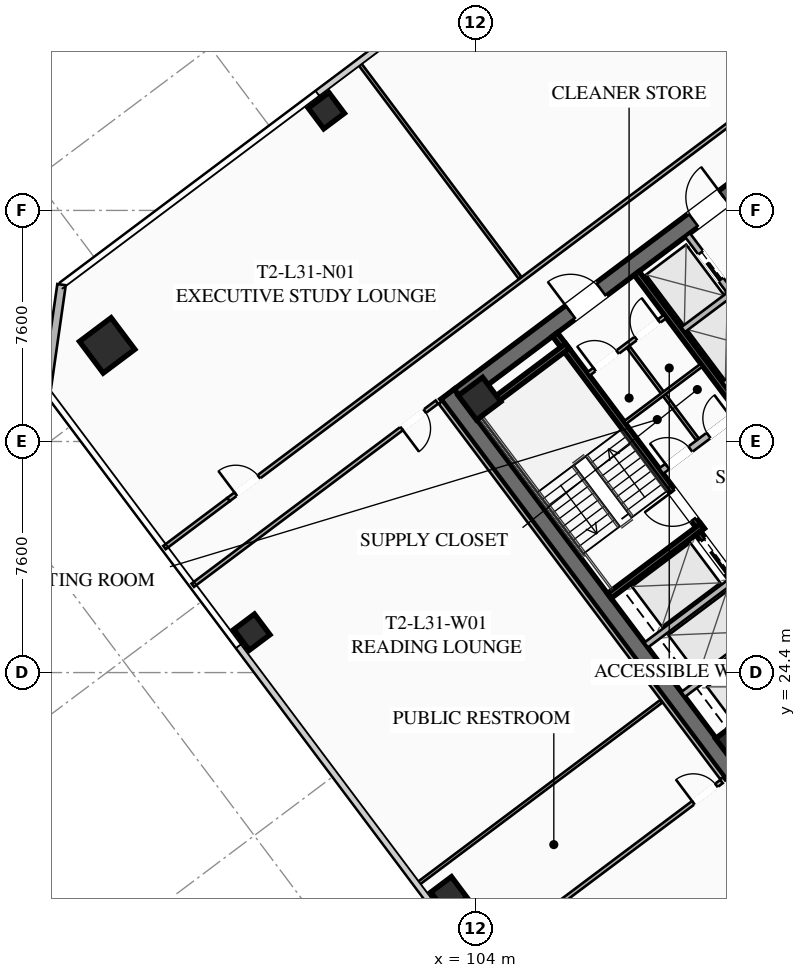
"""IFC4 building model, lengths in metres.
Left out: names, types, materials, properties, quantities, classifications, styles, units other than length and angle.
Written with IfcOpenShell. Run it as: python <this file> out.ifc"""

import sys

from ifc_helpers import new_model, si_unit, direction, frame, frame_2d, origin, origin_2d, place, context, subcontext, project, spatial, rectangle, hollow_rectangle, extrude, element, fill, save


model = new_model("IFC4")
c1 = context("Model", 3, precision=1e-05, world=origin(), true_north=direction((0.0, 1.0)))
c2 = subcontext(c1, "Body", "Model", "MODEL_VIEW")
j1 = project(units=[si_unit("LENGTHUNIT", "METRE"), si_unit("PLANEANGLEUNIT", "RADIAN")], contexts=[c1])
p1 = place(None, origin())
s1 = spatial("IfcSite", under=j1, at=p1, CompositionType="ELEMENT")
p2 = place(p1, origin())
s2 = spatial("IfcBuilding", under=s1, at=p2, CompositionType="ELEMENT")
p3 = place(p2, frame((0.0, 0.0, 117.95)))
s3 = spatial("IfcBuildingStorey", under=s2, at=p3, CompositionType="ELEMENT", Elevation=117.95)
p4 = place(p3, frame((112.436, 21.077, 0.0), z_axis=(0.0, 0.0, 1.0), x_axis=(-0.600005007985, 0.799996243986, 0.0)))
e1 = element("IfcWall", 1, at=p4, inside=s3, PredefinedType="SHEAR", context=c2, shape_type="SweptSolid", body=[
    extrude(rectangle(XDim=15.6, YDim=0.55, at=frame_2d((7.8, 0.0))), origin(), (0.0, 0.0, 1.0), 3.55),
])
p5 = place(p3, frame((103.461, 33.502, 0.0), z_axis=(0.0, 0.0, 1.0), x_axis=(0.799998054672, 0.600002593761, 0.0)))
e2 = element("IfcWall", 2, at=p5, inside=s3, PredefinedType="SHEAR", context=c2, shape_type="SweptSolid", body=[
    extrude(rectangle(XDim=15.06, YDim=0.55, at=frame_2d((7.53, 0.0))), origin(), (0.0, 0.0, 1.0), 3.55),
])
p6 = place(p5, frame((4.58, 0.0, 0.0)))
e3 = element("IfcOpeningElement", 3, at=p6, cuts=e2, PredefinedType="OPENING", context=c2, shape_type="SweptSolid", body=[
    extrude(rectangle(XDim=1.25, YDim=2.25, at=frame_2d((0.625, 1.125))), frame((0.0, 0.285, 0.0), z_axis=(0.0, -1.0, 0.0), x_axis=(1.0, 0.0, 0.0)), (0.0, 0.0, 1.0), 0.57),
])
p7 = place(p5, frame((9.63, 0.0, 0.0)))
e4 = element("IfcOpeningElement", 4, at=p7, cuts=e2, PredefinedType="OPENING", context=c2, shape_type="SweptSolid", body=[
    extrude(rectangle(XDim=1.25, YDim=2.25, at=frame_2d((0.625, 1.125))), frame((0.0, 0.285, 0.0), z_axis=(0.0, -1.0, 0.0), x_axis=(1.0, 0.0, 0.0)), (0.0, 0.0, 1.0), 0.57),
])
for number, where, z_axis, x_axis in (
    (5, (112.59, 22.13, 0.0), (0.0, 0.0, 1.0), (0.8, 0.6, 0.0)),
    (6, (104.13, 33.41, 0.0), (0.0, 0.0, 1.0), (0.8, 0.6, 0.0)),
):
    element("IfcColumn", number, at=place(p3, frame(where, z_axis=z_axis, x_axis=x_axis)), inside=s3, PredefinedType="COLUMN", context=c2, shape_type="SweptSolid", body=[
        extrude(hollow_rectangle(XDim=1.0, YDim=1.0, WallThickness=0.04, at=origin_2d()), origin(), (0.0, 0.0, 1.0), 3.37),
    ])
p8 = place(p3, frame((91.88, 35.16, 0.0), z_axis=(0.0, 0.0, 1.0), x_axis=(0.799999996291, 0.600000004945, 0.0)))
e7 = element("IfcColumn", 7, at=p8, inside=s3, PredefinedType="COLUMN", context=c2, shape_type="SweptSolid", body=[
    extrude(hollow_rectangle(XDim=1.3, YDim=1.3, WallThickness=0.05, at=origin_2d()), origin(), (0.0, 0.0, 1.0), 3.37),
])
for number, where, z_axis, x_axis in (
    (8, (99.09, 42.88, 0.0), (0.0, 0.0, 1.0), (0.8, 0.6, 0.0)),
    (9, (96.64, 25.73, 0.0), (0.0, 0.0, 1.0), (0.8, 0.6, 0.0)),
    (10, (103.12, 17.09, 0.0), (0.0, 0.0, 1.0), (0.8, 0.6, 0.0)),
):
    element("IfcColumn", number, at=place(p3, frame(where, z_axis=z_axis, x_axis=x_axis)), inside=s3, PredefinedType="COLUMN", context=c2, shape_type="SweptSolid", body=[
        extrude(hollow_rectangle(XDim=0.85, YDim=0.85, WallThickness=0.035, at=origin_2d()), origin(), (0.0, 0.0, 1.0), 3.37),
    ])
p9 = place(p3, frame((89.88, 33.66, 0.0), z_axis=(0.0, 0.0, 1.0), x_axis=(0.141421356237, 0.989949493661, 0.0)))
e11 = element("IfcWall", 11, at=p9, inside=s3, PredefinedType="SOLIDWALL", context=c2, shape_type="SweptSolid", body=[
    extrude(rectangle(XDim=3.536, YDim=0.28, at=frame_2d((1.768, 0.0))), origin(), (0.0, 0.0, 1.0), 3.37),
])
p10 = place(p3, frame((111.44, 29.08, 0.0), z_axis=(0.0, 0.0, 1.0), x_axis=(-0.59999029481, 0.8000072788, 0.0)))
e12 = element("IfcWall", 12, at=p10, inside=s3, PredefinedType="SHEAR", context=c2, shape_type="SweptSolid", body=[
    extrude(rectangle(XDim=8.05, YDim=0.2, at=frame_2d((4.025, 0.0))), origin(), (0.0, 0.0, 1.0), 3.37),
])
p11 = place(p10, frame((0.45, 0.0, 0.0)))
e13 = element("IfcOpeningElement", 13, at=p11, cuts=e12, PredefinedType="OPENING", context=c2, shape_type="SweptSolid", body=[
    extrude(rectangle(XDim=1.15, YDim=2.2, at=frame_2d((0.575, 1.1))), frame((0.0, 0.11, 0.0), z_axis=(0.0, -1.0, 0.0), x_axis=(1.0, 0.0, 0.0)), (0.0, 0.0, 1.0), 0.22),
])
for number, where, z_axis, x_axis in (
    (14, (108.396, 26.922, 0.0), (0.0, 0.0, 1.0), (0.8, 0.6, 0.0)),
    (15, (103.956, 32.842, 0.0), (0.0, 0.0, 1.0), (0.8, 0.6, 0.0)),
):
    element("IfcWall", number, at=place(p3, frame(where, z_axis=z_axis, x_axis=x_axis)), inside=s3, PredefinedType="SHEAR", context=c2, shape_type="SweptSolid", body=[
        extrude(rectangle(XDim=3.83, YDim=0.2, at=frame_2d((1.915, 0.0))), origin(), (0.0, 0.0, 1.0), 3.37),
    ])
p12 = place(p3, frame((117.998, 25.936, 0.0), z_axis=(0.0, 0.0, 1.0), x_axis=(-0.600002693989, 0.799997979501, 0.0)))
e16 = element("IfcWall", 16, at=p12, inside=s3, PredefinedType="SHEAR", context=c2, shape_type="SweptSolid", body=[
    extrude(rectangle(XDim=14.5, YDim=0.2, at=frame_2d((7.25, 0.0))), origin(), (0.0, 0.0, 1.0), 3.37),
])
p13 = place(p3, frame((110.104, 31.028, 0.0), z_axis=(0.0, 0.0, 1.0), x_axis=(0.800018601094, 0.59997519774, 0.0)))
e17 = element("IfcWall", 17, at=p13, inside=s3, PredefinedType="SOLIDWALL", context=c2, shape_type="SweptSolid", body=[
    extrude(rectangle(XDim=3.15, YDim=0.22, at=frame_2d((1.575, 0.0))), origin(), (0.0, 0.0, 1.0), 2.723),
])
p14 = place(p13, frame((0.25, 0.0, 0.0)))
e18 = element("IfcOpeningElement", 18, at=p14, cuts=e17, PredefinedType="OPENING", context=c2, shape_type="SweptSolid", body=[
    extrude(rectangle(XDim=0.95, YDim=2.05, at=frame_2d((0.475, 1.025))), frame((0.0, 0.12, 0.0), z_axis=(0.0, -1.0, 0.0), x_axis=(1.0, 0.0, 0.0)), (0.0, 0.0, 1.0), 0.24),
])
p15 = place(p13, frame((1.95, 0.0, 0.0)))
e19 = element("IfcOpeningElement", 19, at=p15, cuts=e17, PredefinedType="OPENING", context=c2, shape_type="SweptSolid", body=[
    extrude(rectangle(XDim=0.95, YDim=2.05, at=frame_2d((0.475, 1.025))), frame((0.0, 0.12, 0.0), z_axis=(0.0, -1.0, 0.0), x_axis=(1.0, 0.0, 0.0)), (0.0, 0.0, 1.0), 0.24),
])
p16 = place(p3, frame((115.19, 23.83, 0.0), z_axis=(0.0, 0.0, 1.0), x_axis=(-0.599993943644, 0.800004542231, 0.0)))
e20 = element("IfcWall", 20, at=p16, inside=s3, PredefinedType="SHEAR", context=c2, shape_type="SweptSolid", body=[
    extrude(rectangle(XDim=6.45, YDim=0.2, at=frame_2d((3.225, 0.0))), origin(), (0.0, 0.0, 1.0), 3.37),
])
p17 = place(p16, frame((4.875, 0.0, 0.0)))
e21 = element("IfcOpeningElement", 21, at=p17, cuts=e20, PredefinedType="OPENING", context=c2, shape_type="SweptSolid", body=[
    extrude(rectangle(XDim=1.3, YDim=2.25, at=frame_2d((0.65, 1.125))), frame((0.0, 0.11, 0.0), z_axis=(0.0, -1.0, 0.0), x_axis=(1.0, 0.0, 0.0)), (0.0, 0.0, 1.0), 0.22),
])
p18 = place(p16, frame((2.875, 0.0, 0.0)))
e22 = element("IfcOpeningElement", 22, at=p18, cuts=e20, PredefinedType="OPENING", context=c2, shape_type="SweptSolid", body=[
    extrude(rectangle(XDim=1.3, YDim=2.25, at=frame_2d((0.65, 1.125))), frame((0.0, 0.11, 0.0), z_axis=(0.0, -1.0, 0.0), x_axis=(1.0, 0.0, 0.0)), (0.0, 0.0, 1.0), 0.22),
])
p19 = place(p16, frame((0.675, 0.0, 0.0)))
e23 = element("IfcOpeningElement", 23, at=p19, cuts=e20, PredefinedType="OPENING", context=c2, shape_type="SweptSolid", body=[
    extrude(rectangle(XDim=1.3, YDim=2.25, at=frame_2d((0.65, 1.125))), frame((0.0, 0.11, 0.0), z_axis=(0.0, -1.0, 0.0), x_axis=(1.0, 0.0, 0.0)), (0.0, 0.0, 1.0), 0.22),
])
for number, where, z_axis, x_axis in (
    (24, (110.826, 23.682, 0.0), (0.0, 0.0, 1.0), (0.8, 0.6, 0.0)),
    (25, (109.608, 25.306, 0.0), (0.0, 0.0, 1.0), (0.8, 0.6, 0.0)),
):
    element("IfcWall", number, at=place(p3, frame(where, z_axis=z_axis, x_axis=x_axis)), inside=s3, PredefinedType="SOLIDWALL", context=c2, shape_type="SweptSolid", body=[
        extrude(rectangle(XDim=3.48, YDim=0.2, at=frame_2d((1.74, 0.0))), origin(), (0.0, 0.0, 1.0), 3.37),
    ])
p20 = place(p3, frame((107.71, 34.22, 0.0), z_axis=(0.0, 0.0, 1.0), x_axis=(0.799981399002, 0.60002480053, 0.0)))
e26 = element("IfcWall", 26, at=p20, inside=s3, PredefinedType="PARTITIONING", context=c2, shape_type="SweptSolid", body=[
    extrude(rectangle(XDim=3.15, YDim=0.135, at=frame_2d((1.575, 0.0))), origin(), (0.0, 0.0, 1.0), 2.723),
])
p21 = place(p20, frame((0.25, 0.0, 0.0)))
e27 = element("IfcOpeningElement", 27, at=p21, cuts=e26, PredefinedType="OPENING", context=c2, shape_type="SweptSolid", body=[
    extrude(rectangle(XDim=0.95, YDim=2.05, at=frame_2d((0.475, 1.025))), frame((0.0, 0.077, 0.0), z_axis=(0.0, -1.0, 0.0), x_axis=(1.0, 0.0, 0.0)), (0.0, 0.0, 1.0), 0.155),
])
p22 = place(p20, frame((1.95, 0.0, 0.0)))
e28 = element("IfcOpeningElement", 28, at=p22, cuts=e26, PredefinedType="OPENING", context=c2, shape_type="SweptSolid", body=[
    extrude(rectangle(XDim=0.95, YDim=2.05, at=frame_2d((0.475, 1.025))), frame((0.0, 0.077, 0.0), z_axis=(0.0, -1.0, 0.0), x_axis=(1.0, 0.0, 0.0)), (0.0, 0.0, 1.0), 0.155),
])
p23 = place(p3, frame((111.296, 32.072, 0.0), z_axis=(0.0, 0.0, 1.0), x_axis=(-0.59995887973, 0.800030838552, 0.0)))
e29 = element("IfcWall", 29, at=p23, inside=s3, PredefinedType="PARTITIONING", context=c2, shape_type="SweptSolid", body=[
    extrude(rectangle(XDim=3.8, YDim=0.11, at=frame_2d((1.9, 0.0))), origin(), (0.0, 0.0, 1.0), 2.723),
])
p24 = place(p3, frame((108.91, 32.62, 0.0), z_axis=(0.0, 0.0, 1.0), x_axis=(0.800018601094, 0.59997519774, 0.0)))
e30 = element("IfcWall", 30, at=p24, inside=s3, PredefinedType="PARTITIONING", context=c2, shape_type="SweptSolid", body=[
    extrude(rectangle(XDim=3.15, YDim=0.11, at=frame_2d((1.575, 0.0))), origin(), (0.0, 0.0, 1.0), 2.723),
])
p25 = place(p3, frame((115.11, 33.27, 0.0), z_axis=(0.0, 0.0, 1.0), x_axis=(-0.600011322243, 0.799991508192, 0.0)))
e31 = element("IfcWall", 31, at=p25, inside=s3, PredefinedType="SOLIDWALL", context=c2, shape_type="SweptSolid", body=[
    extrude(rectangle(XDim=6.9, YDim=0.2, at=frame_2d((3.45, 0.0))), origin(), (0.0, 0.0, 1.0), 3.37),
])
p26 = place(p25, frame((0.575, 0.0, 0.0)))
e32 = element("IfcOpeningElement", 32, at=p26, cuts=e31, PredefinedType="OPENING", context=c2, shape_type="SweptSolid", body=[
    extrude(rectangle(XDim=1.1, YDim=2.2, at=frame_2d((0.55, 1.1))), frame((0.0, 0.11, 0.0), z_axis=(0.0, -1.0, 0.0), x_axis=(1.0, 0.0, 0.0)), (0.0, 0.0, 1.0), 0.22),
])
p27 = place(p25, frame((2.825, 0.0, 0.0)))
e33 = element("IfcOpeningElement", 33, at=p27, cuts=e31, PredefinedType="OPENING", context=c2, shape_type="SweptSolid", body=[
    extrude(rectangle(XDim=1.1, YDim=2.2, at=frame_2d((0.55, 1.1))), frame((0.0, 0.11, 0.0), z_axis=(0.0, -1.0, 0.0), x_axis=(1.0, 0.0, 0.0)), (0.0, 0.0, 1.0), 0.22),
])
p28 = place(p25, frame((5.075, 0.0, 0.0)))
e34 = element("IfcOpeningElement", 34, at=p28, cuts=e31, PredefinedType="OPENING", context=c2, shape_type="SweptSolid", body=[
    extrude(rectangle(XDim=1.1, YDim=2.2, at=frame_2d((0.55, 1.1))), frame((0.0, 0.11, 0.0), z_axis=(0.0, -1.0, 0.0), x_axis=(1.0, 0.0, 0.0)), (0.0, 0.0, 1.0), 0.22),
])
p29 = place(p3, frame((112.176, 33.882, 0.0), z_axis=(0.0, 0.0, 1.0), x_axis=(0.8, 0.6, 0.0)))
e35 = element("IfcWall", 35, at=p29, inside=s3, PredefinedType="SOLIDWALL", context=c2, shape_type="SweptSolid", body=[
    extrude(rectangle(XDim=1.88, YDim=0.2, at=frame_2d((0.94, 0.0))), origin(), (0.0, 0.0, 1.0), 3.37),
])
p30 = place(p3, frame((110.826, 35.682, 0.0), z_axis=(0.0, 0.0, 1.0), x_axis=(0.799984418148, 0.600020775241, 0.0)))
e36 = element("IfcWall", 36, at=p30, inside=s3, PredefinedType="SOLIDWALL", context=c2, shape_type="SweptSolid", body=[
    extrude(rectangle(XDim=1.88, YDim=0.2, at=frame_2d((0.94, 0.0))), origin(), (0.0, 0.0, 1.0), 3.37),
])
p31 = place(p3, frame((95.87, 30.09, 0.0), z_axis=(0.0, 0.0, 1.0), x_axis=(0.799997191971, 0.600003744021, 0.0)))
e37 = element("IfcWall", 37, at=p31, inside=s3, PredefinedType="PARTITIONING", context=c2, shape_type="SweptSolid", body=[
    extrude(rectangle(XDim=31.3, YDim=0.135, at=frame_2d((15.65, 0.0))), origin(), (0.0, 0.0, 1.0), 2.723),
])
p32 = place(p31, frame((0.3, 0.0, 0.0)))
e38 = element("IfcOpeningElement", 38, at=p32, cuts=e37, PredefinedType="OPENING", context=c2, shape_type="SweptSolid", body=[
    extrude(rectangle(XDim=0.95, YDim=2.05, at=frame_2d((0.475, 1.025))), frame((0.0, 0.077, 0.0), z_axis=(0.0, -1.0, 0.0), x_axis=(1.0, 0.0, 0.0)), (0.0, 0.0, 1.0), 0.155),
])
p33 = place(p31, frame((30.05, 0.0, 0.0)))
e39 = element("IfcOpeningElement", 39, at=p33, cuts=e37, PredefinedType="OPENING", context=c2, shape_type="SweptSolid", body=[
    extrude(rectangle(XDim=0.95, YDim=2.05, at=frame_2d((0.475, 1.025))), frame((0.0, 0.077, 0.0), z_axis=(0.0, -1.0, 0.0), x_axis=(1.0, 0.0, 0.0)), (0.0, 0.0, 1.0), 0.155),
])
p34 = place(p3, frame((93.766, 28.512, 0.0), z_axis=(0.0, 0.0, 1.0), x_axis=(0.799977721118, 0.600029704027, 0.0)))
e40 = element("IfcWall", 40, at=p34, inside=s3, PredefinedType="PARTITIONING", context=c2, shape_type="SweptSolid", body=[
    extrude(rectangle(XDim=2.63, YDim=0.135, at=frame_2d((1.315, 0.0))), origin(), (0.0, 0.0, 1.0), 2.723),
])
p35 = place(p3, frame((105.462, 37.384, 0.0), z_axis=(0.0, 0.0, 1.0), x_axis=(-0.599982344389, 0.800013241404, 0.0)))
e41 = element("IfcWall", 41, at=p35, inside=s3, PredefinedType="PARTITIONING", context=c2, shape_type="SweptSolid", body=[
    extrude(rectangle(XDim=8.85, YDim=0.11, at=frame_2d((4.425, 0.0))), origin(), (0.0, 0.0, 1.0), 2.723),
])
p36 = place(p3, frame((133.282, 32.374, 0.0), z_axis=(0.0, 0.0, 1.0), x_axis=(-0.8, -0.6, 0.0)))
e42 = element("IfcWall", 42, at=p36, inside=s3, PredefinedType="PARTITIONING", context=c2, shape_type="SweptSolid", body=[
    extrude(rectangle(XDim=31.3, YDim=0.135, at=frame_2d((15.65, 0.0))), origin(), (0.0, 0.0, 1.0), 2.723),
])
p37 = place(p36, frame((29.97, 0.0, 0.0)))
e43 = element("IfcOpeningElement", 43, at=p37, cuts=e42, PredefinedType="OPENING", context=c2, shape_type="SweptSolid", body=[
    extrude(rectangle(XDim=0.95, YDim=2.05, at=frame_2d((0.475, 1.025))), frame((0.0, 0.077, 0.0), z_axis=(0.0, -1.0, 0.0), x_axis=(1.0, 0.0, 0.0)), (0.0, 0.0, 1.0), 0.155),
])
p38 = place(p36, frame((19.151, 0.0, 0.0)))
e44 = element("IfcOpeningElement", 44, at=p38, cuts=e42, PredefinedType="OPENING", context=c2, shape_type="SweptSolid", body=[
    extrude(rectangle(XDim=0.95, YDim=2.05, at=frame_2d((0.475, 1.025))), frame((0.0, 0.077, 0.0), z_axis=(0.0, -1.0, 0.0), x_axis=(1.0, 0.0, 0.0)), (0.0, 0.0, 1.0), 0.155),
])
p39 = place(p36, frame((14.901, 0.0, 0.0)))
e45 = element("IfcOpeningElement", 45, at=p39, cuts=e42, PredefinedType="OPENING", context=c2, shape_type="SweptSolid", body=[
    extrude(rectangle(XDim=0.95, YDim=2.05, at=frame_2d((0.475, 1.025))), frame((0.0, 0.077, 0.0), z_axis=(0.0, -1.0, 0.0), x_axis=(1.0, 0.0, 0.0)), (0.0, 0.0, 1.0), 0.155),
])
p40 = place(p36, frame((10.92, 0.0, 0.0)))
e46 = element("IfcOpeningElement", 46, at=p40, cuts=e42, PredefinedType="OPENING", context=c2, shape_type="SweptSolid", body=[
    extrude(rectangle(XDim=0.95, YDim=2.05, at=frame_2d((0.475, 1.025))), frame((0.0, 0.077, 0.0), z_axis=(0.0, -1.0, 0.0), x_axis=(1.0, 0.0, 0.0)), (0.0, 0.0, 1.0), 0.155),
])
p41 = place(p36, frame((0.38, 0.0, 0.0)))
e47 = element("IfcOpeningElement", 47, at=p41, cuts=e42, PredefinedType="OPENING", context=c2, shape_type="SweptSolid", body=[
    extrude(rectangle(XDim=0.95, YDim=2.05, at=frame_2d((0.475, 1.025))), frame((0.0, 0.077, 0.0), z_axis=(0.0, -1.0, 0.0), x_axis=(1.0, 0.0, 0.0)), (0.0, 0.0, 1.0), 0.155),
])
p42 = place(p3, frame((112.104, 20.928, 0.0), z_axis=(0.0, 0.0, 1.0), x_axis=(-0.599994940075, 0.800003794918, 0.0)))
e48 = element("IfcWall", 48, at=p42, inside=s3, PredefinedType="PARTITIONING", context=c2, shape_type="SweptSolid", body=[
    extrude(rectangle(XDim=15.44, YDim=0.135, at=frame_2d((7.72, 0.0))), origin(), (0.0, 0.0, 1.0), 2.723),
])
p43 = place(p3, frame((102.728, 33.296, 0.0), z_axis=(0.0, 0.0, 1.0), x_axis=(-0.800002918023, -0.599996109283, 0.0)))
e49 = element("IfcWall", 49, at=p43, inside=s3, PredefinedType="PARTITIONING", context=c2, shape_type="SweptSolid", body=[
    extrude(rectangle(XDim=10.04, YDim=0.135, at=frame_2d((5.02, 0.0))), origin(), (0.0, 0.0, 1.0), 2.723),
])
p44 = place(p43, frame((0.5, 0.0, 0.0)))
e50 = element("IfcOpeningElement", 50, at=p44, cuts=e49, PredefinedType="OPENING", context=c2, shape_type="SweptSolid", body=[
    extrude(rectangle(XDim=0.95, YDim=2.05, at=frame_2d((0.475, 1.025))), frame((0.0, 0.077, 0.0), z_axis=(0.0, -1.0, 0.0), x_axis=(1.0, 0.0, 0.0)), (0.0, 0.0, 1.0), 0.155),
])
p45 = place(p3, frame((104.056, 14.792, 0.0), z_axis=(0.0, 0.0, 1.0), x_axis=(0.800002918023, 0.599996109283, 0.0)))
e51 = element("IfcWall", 51, at=p45, inside=s3, PredefinedType="PARTITIONING", context=c2, shape_type="SweptSolid", body=[
    extrude(rectangle(XDim=10.04, YDim=0.135, at=frame_2d((5.02, 0.0))), origin(), (0.0, 0.0, 1.0), 2.723),
])
p46 = place(p45, frame((8.88, 0.0, 0.0)))
e52 = element("IfcOpeningElement", 52, at=p46, cuts=e51, PredefinedType="OPENING", context=c2, shape_type="SweptSolid", body=[
    extrude(rectangle(XDim=0.95, YDim=2.05, at=frame_2d((0.475, 1.025))), frame((0.0, 0.077, 0.0), z_axis=(0.0, -1.0, 0.0), x_axis=(1.0, 0.0, 0.0)), (0.0, 0.0, 1.0), 0.155),
])
p47 = place(p3, frame((102.076, 17.432, 0.0), z_axis=(0.0, 0.0, 1.0), x_axis=(0.799991245945, 0.600011671896, 0.0)))
e53 = element("IfcWall", 53, at=p47, inside=s3, PredefinedType="PARTITIONING", context=c2, shape_type="SweptSolid", body=[
    extrude(rectangle(XDim=10.04, YDim=0.11, at=frame_2d((5.02, 0.0))), origin(), (0.0, 0.0, 1.0), 2.723),
])
p48 = place(p6, origin())
e54 = element("IfcDoor", 54, at=p48, inside=s3, OperationType="SINGLE_SWING_LEFT", PredefinedType="DOOR", context=c2, shape_type="SweptSolid", body=[
    extrude(rectangle(XDim=1.25, YDim=2.25, at=frame_2d((0.625, 1.125))), frame((0.0, 0.025, 0.0), z_axis=(0.0, -1.0, 0.0), x_axis=(1.0, 0.0, 0.0)), (0.0, 0.0, 1.0), 0.05),
])
fill(e3, e54)
p49 = place(p7, origin())
e55 = element("IfcDoor", 55, at=p49, inside=s3, OperationType="SINGLE_SWING_RIGHT", PredefinedType="DOOR", context=c2, shape_type="SweptSolid", body=[
    extrude(rectangle(XDim=1.25, YDim=2.25, at=frame_2d((0.625, 1.125))), frame((0.0, 0.025, 0.0), z_axis=(0.0, -1.0, 0.0), x_axis=(1.0, 0.0, 0.0)), (0.0, 0.0, 1.0), 0.05),
])
fill(e4, e55)
p50 = place(p11, origin())
e56 = element("IfcDoor", 56, at=p50, inside=s3, OperationType="SINGLE_SWING_RIGHT", PredefinedType="DOOR", context=c2, shape_type="SweptSolid", body=[
    extrude(rectangle(XDim=1.15, YDim=2.2, at=frame_2d((0.575, 1.1))), frame((0.0, 0.025, 0.0), z_axis=(0.0, -1.0, 0.0), x_axis=(1.0, 0.0, 0.0)), (0.0, 0.0, 1.0), 0.05),
])
fill(e13, e56)
p51 = place(p21, origin())
e57 = element("IfcDoor", 57, at=p51, inside=s3, OperationType="SINGLE_SWING_LEFT", PredefinedType="DOOR", context=c2, shape_type="SweptSolid", body=[
    extrude(rectangle(XDim=0.95, YDim=2.05, at=frame_2d((0.475, 1.025))), frame((0.0, 0.025, 0.0), z_axis=(0.0, -1.0, 0.0), x_axis=(1.0, 0.0, 0.0)), (0.0, 0.0, 1.0), 0.05),
])
fill(e27, e57)
p52 = place(p22, origin())
e58 = element("IfcDoor", 58, at=p52, inside=s3, OperationType="SINGLE_SWING_RIGHT", PredefinedType="DOOR", context=c2, shape_type="SweptSolid", body=[
    extrude(rectangle(XDim=0.95, YDim=2.05, at=frame_2d((0.475, 1.025))), frame((0.0, 0.025, 0.0), z_axis=(0.0, -1.0, 0.0), x_axis=(1.0, 0.0, 0.0)), (0.0, 0.0, 1.0), 0.05),
])
fill(e28, e58)
p53 = place(p14, origin())
e59 = element("IfcDoor", 59, at=p53, inside=s3, OperationType="SINGLE_SWING_LEFT", PredefinedType="DOOR", context=c2, shape_type="SweptSolid", body=[
    extrude(rectangle(XDim=0.95, YDim=2.05, at=frame_2d((0.475, 1.025))), frame((0.0, 0.025, 0.0), z_axis=(0.0, -1.0, 0.0), x_axis=(1.0, 0.0, 0.0)), (0.0, 0.0, 1.0), 0.05),
])
fill(e18, e59)
p54 = place(p15, origin())
e60 = element("IfcDoor", 60, at=p54, inside=s3, OperationType="SINGLE_SWING_RIGHT", PredefinedType="DOOR", context=c2, shape_type="SweptSolid", body=[
    extrude(rectangle(XDim=0.95, YDim=2.05, at=frame_2d((0.475, 1.025))), frame((0.0, 0.025, 0.0), z_axis=(0.0, -1.0, 0.0), x_axis=(1.0, 0.0, 0.0)), (0.0, 0.0, 1.0), 0.05),
])
fill(e19, e60)
p55 = place(p32, origin())
e61 = element("IfcDoor", 61, at=p55, inside=s3, OperationType="SINGLE_SWING_LEFT", PredefinedType="DOOR", context=c2, shape_type="SweptSolid", body=[
    extrude(rectangle(XDim=0.95, YDim=2.05, at=frame_2d((0.475, 1.025))), frame((0.0, 0.025, 0.0), z_axis=(0.0, -1.0, 0.0), x_axis=(1.0, 0.0, 0.0)), (0.0, 0.0, 1.0), 0.05),
])
fill(e38, e61)
p56 = place(p44, origin())
e62 = element("IfcDoor", 62, at=p56, inside=s3, OperationType="SINGLE_SWING_RIGHT", PredefinedType="DOOR", context=c2, shape_type="SweptSolid", body=[
    extrude(rectangle(XDim=0.95, YDim=2.05, at=frame_2d((0.475, 1.025))), frame((0.0, 0.025, 0.0), z_axis=(0.0, -1.0, 0.0), x_axis=(1.0, 0.0, 0.0)), (0.0, 0.0, 1.0), 0.05),
])
fill(e50, e62)
p57 = place(p46, origin())
e63 = element("IfcDoor", 63, at=p57, inside=s3, OperationType="SINGLE_SWING_LEFT", PredefinedType="DOOR", context=c2, shape_type="SweptSolid", body=[
    extrude(rectangle(XDim=0.95, YDim=2.05, at=frame_2d((0.475, 1.025))), frame((0.0, 0.025, 0.0), z_axis=(0.0, -1.0, 0.0), x_axis=(1.0, 0.0, 0.0)), (0.0, 0.0, 1.0), 0.05),
])
fill(e52, e63)
p58 = place(p17, origin())
e64 = element("IfcDoor", 64, at=p58, inside=s3, OperationType="SLIDING_TO_LEFT", PredefinedType="DOOR", context=c2, shape_type="SweptSolid", body=[
    extrude(rectangle(XDim=1.3, YDim=2.25, at=frame_2d((0.65, 1.125))), frame((0.0, 0.025, 0.0), z_axis=(0.0, -1.0, 0.0), x_axis=(1.0, 0.0, 0.0)), (0.0, 0.0, 1.0), 0.05),
])
fill(e21, e64)
p59 = place(p28, origin())
e65 = element("IfcDoor", 65, at=p59, inside=s3, OperationType="SLIDING_TO_LEFT", PredefinedType="DOOR", context=c2, shape_type="SweptSolid", body=[
    extrude(rectangle(XDim=1.1, YDim=2.2, at=frame_2d((0.55, 1.1))), frame((0.0, 0.025, 0.0), z_axis=(0.0, -1.0, 0.0), x_axis=(1.0, 0.0, 0.0)), (0.0, 0.0, 1.0), 0.05),
])
fill(e34, e65)
save(model, sys.argv[1])
